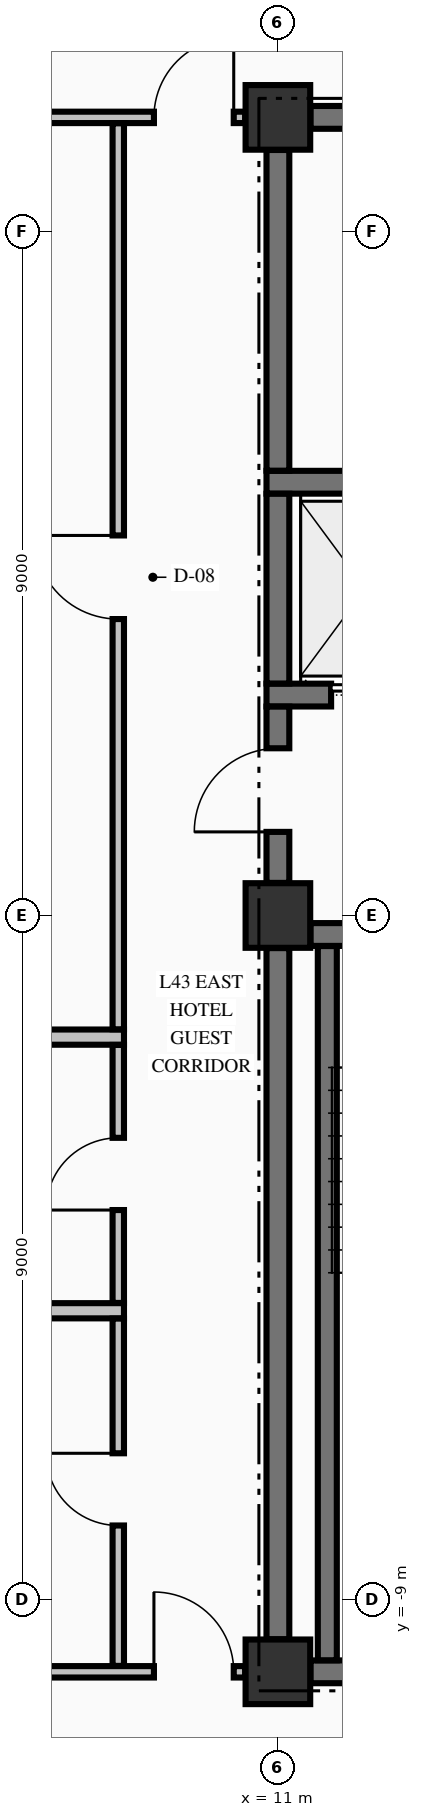
"""IFC4 building model, lengths in metres.
Left out: names, types, materials, properties, quantities, classifications, styles, units other than length and angle.
Written with IfcOpenShell. Run it as: python <this file> out.ifc"""

import sys

from ifc_helpers import new_model, si_unit, direction, frame, frame_2d, origin, origin_2d, place, context, subcontext, project, spatial, rectangle, extrude, element, fill, save


model = new_model("IFC4")
c1 = context("Model", 3, precision=1e-05, world=origin(), true_north=direction((0.0, 1.0)))
c2 = subcontext(c1, "Body", "Model", "MODEL_VIEW")
j1 = project(units=[si_unit("LENGTHUNIT", "METRE"), si_unit("PLANEANGLEUNIT", "RADIAN")], contexts=[c1])
p1 = place(None, origin())
s1 = spatial("IfcSite", under=j1, at=p1, CompositionType="ELEMENT")
p2 = place(p1, origin())
s2 = spatial("IfcBuilding", under=s1, at=p2, CompositionType="ELEMENT")
p3 = place(p2, frame((0.0, 0.0, 169.46)))
s3 = spatial("IfcBuildingStorey", under=s2, at=p3, CompositionType="ELEMENT", Elevation=169.46)
for number, where, z_axis, x_axis in (
    (1, (11.0, -9.95, -0.25), (0.0, 0.0, 1.0), (1.0, 0.0, 0.0)),
    (2, (11.0, 0.0, -0.25), (0.0, 0.0, 1.0), (1.0, 0.0, 0.0)),
    (3, (11.0, 10.5, -0.25), (0.0, 0.0, 1.0), (1.0, 0.0, 0.0)),
):
    element("IfcColumn", number, at=place(p3, frame(where, z_axis=z_axis, x_axis=x_axis)), inside=s3, PredefinedType="COLUMN", context=c2, shape_type="SweptSolid", body=[
        extrude(rectangle(XDim=0.85, YDim=0.85, at=origin_2d()), origin(), (0.0, 0.0, 1.0), 3.4),
    ])
p4 = place(p3, frame((11.429, -9.95, 0.0), z_axis=(0.0, 0.0, 1.0), x_axis=(1.0, 0.0, 0.0)))
e4 = element("IfcWall", 4, at=p4, inside=s3, PredefinedType="SHEAR", context=c2, shape_type="SweptSolid", body=[
    extrude(rectangle(XDim=3.271, YDim=0.3, at=frame_2d((1.635, 0.0))), origin(), (0.0, 0.0, 1.0), 3.15),
])
p5 = place(p3, frame((11.429, -0.25, 0.0), z_axis=(0.0, 0.0, 1.0), x_axis=(1.0, 0.0, 0.0)))
e5 = element("IfcWall", 5, at=p5, inside=s3, PredefinedType="SHEAR", context=c2, shape_type="SweptSolid", body=[
    extrude(rectangle(XDim=3.446, YDim=0.3, at=frame_2d((1.723, 0.0))), origin(), (0.0, 0.0, 1.0), 3.15),
])
p6 = place(p5, frame((1.171, 0.0, 0.0)))
e6 = element("IfcOpeningElement", 6, at=p6, cuts=e5, PredefinedType="OPENING", context=c2, shape_type="SweptSolid", body=[
    extrude(rectangle(XDim=1.1, YDim=2.15, at=frame_2d((0.55, 1.075))), frame((0.0, 0.16, 0.0), z_axis=(0.0, -1.0, 0.0), x_axis=(1.0, 0.0, 0.0)), (0.0, 0.0, 1.0), 0.32),
])
p7 = place(p3, frame((10.85, 2.9, 0.0), z_axis=(0.0, 0.0, 1.0), x_axis=(1.0, 0.0, 0.0)))
e7 = element("IfcWall", 7, at=p7, inside=s3, PredefinedType="SHEAR", context=c2, shape_type="SweptSolid", body=[
    extrude(rectangle(XDim=4.025, YDim=0.3, at=frame_2d((2.012, 0.0))), origin(), (0.0, 0.0, 1.0), 3.15),
])
p8 = place(p7, frame((0.85, 0.0, 0.0)))
e8 = element("IfcOpeningElement", 8, at=p8, cuts=e7, PredefinedType="OPENING", context=c2, shape_type="SweptSolid", body=[
    extrude(rectangle(XDim=1.1, YDim=2.2, at=frame_2d((0.55, 1.1))), frame((0.0, 0.16, 0.0), z_axis=(0.0, -1.0, 0.0), x_axis=(1.0, 0.0, 0.0)), (0.0, 0.0, 1.0), 0.32),
])
p9 = place(p3, frame((10.85, 5.7, 0.0), z_axis=(0.0, 0.0, 1.0), x_axis=(1.0, 0.0, 0.0)))
e9 = element("IfcWall", 9, at=p9, inside=s3, PredefinedType="SHEAR", context=c2, shape_type="SweptSolid", body=[
    extrude(rectangle(XDim=4.025, YDim=0.3, at=frame_2d((2.012, 0.0))), origin(), (0.0, 0.0, 1.0), 3.15),
])
p10 = place(p3, frame((11.429, 10.5, 0.0), z_axis=(0.0, 0.0, 1.0), x_axis=(1.0, 0.0, 0.0)))
e10 = element("IfcWall", 10, at=p10, inside=s3, PredefinedType="SHEAR", context=c2, shape_type="SweptSolid", body=[
    extrude(rectangle(XDim=3.271, YDim=0.3, at=frame_2d((1.635, 0.0))), origin(), (0.0, 0.0, 1.0), 3.15),
])
p11 = place(p10, frame((1.546, 0.0, 0.0)))
e11 = element("IfcOpeningElement", 11, at=p11, cuts=e10, PredefinedType="OPENING", context=c2, shape_type="SweptSolid", body=[
    extrude(rectangle(XDim=0.95, YDim=2.15, at=frame_2d((0.475, 1.075))), frame((0.0, 0.16, 0.0), z_axis=(0.0, -1.0, 0.0), x_axis=(1.0, 0.0, 0.0)), (0.0, 0.0, 1.0), 0.32),
])
p12 = place(p3, frame((-10.569, -9.95, 0.0), z_axis=(0.0, 0.0, 1.0), x_axis=(1.0, 0.0, 0.0)))
e12 = element("IfcWall", 12, at=p12, inside=s3, PredefinedType="PARTITIONING", context=c2, shape_type="SweptSolid", body=[
    extrude(rectangle(XDim=21.138, YDim=0.15, at=frame_2d((10.569, 0.0))), origin(), (0.0, 0.0, 1.0), 3.15),
])
p13 = place(p12, frame((0.15, 0.0, 0.0)))
e13 = element("IfcOpeningElement", 13, at=p13, cuts=e12, PredefinedType="OPENING", context=c2, shape_type="SweptSolid", body=[
    extrude(rectangle(XDim=1.05, YDim=2.15, at=frame_2d((0.525, 1.075))), frame((0.0, 0.085, 0.0), z_axis=(0.0, -1.0, 0.0), x_axis=(1.0, 0.0, 0.0)), (0.0, 0.0, 1.0), 0.17),
])
p14 = place(p12, frame((19.938, 0.0, 0.0)))
e14 = element("IfcOpeningElement", 14, at=p14, cuts=e12, PredefinedType="OPENING", context=c2, shape_type="SweptSolid", body=[
    extrude(rectangle(XDim=1.05, YDim=2.15, at=frame_2d((0.525, 1.075))), frame((0.0, 0.085, 0.0), z_axis=(0.0, -1.0, 0.0), x_axis=(1.0, 0.0, 0.0)), (0.0, 0.0, 1.0), 0.17),
])
p15 = place(p12, frame((12.144, 0.0, 0.0)))
e15 = element("IfcOpeningElement", 15, at=p15, cuts=e12, PredefinedType="OPENING", context=c2, shape_type="SweptSolid", body=[
    extrude(rectangle(XDim=0.95, YDim=2.15, at=frame_2d((0.475, 1.075))), frame((0.0, 0.085, 0.0), z_axis=(0.0, -1.0, 0.0), x_axis=(1.0, 0.0, 0.0)), (0.0, 0.0, 1.0), 0.17),
])
for number, where, z_axis, x_axis in (
    (16, (-1.9, -5.2, 0.0), (0.0, 0.0, 1.0), (1.0, 0.0, 0.0)),
    (17, (-1.9, -1.6, 0.0), (0.0, 0.0, 1.0), (1.0, 0.0, 0.0)),
):
    element("IfcWall", number, at=place(p3, frame(where, z_axis=z_axis, x_axis=x_axis)), inside=s3, PredefinedType="PARTITIONING", context=c2, shape_type="SweptSolid", body=[
        extrude(rectangle(XDim=10.875, YDim=0.2, at=frame_2d((5.438, 0.0))), origin(), (0.0, 0.0, 1.0), 3.15),
    ])
p16 = place(p3, frame((-10.569, 10.5, 0.0), z_axis=(0.0, 0.0, 1.0), x_axis=(1.0, 0.0, 0.0)))
e18 = element("IfcWall", 18, at=p16, inside=s3, PredefinedType="PARTITIONING", context=c2, shape_type="SweptSolid", body=[
    extrude(rectangle(XDim=21.138, YDim=0.15, at=frame_2d((10.569, 0.0))), origin(), (0.0, 0.0, 1.0), 3.15),
])
p17 = place(p16, frame((0.15, 0.0, 0.0)))
e19 = element("IfcOpeningElement", 19, at=p17, cuts=e18, PredefinedType="OPENING", context=c2, shape_type="SweptSolid", body=[
    extrude(rectangle(XDim=1.05, YDim=2.15, at=frame_2d((0.525, 1.075))), frame((0.0, 0.085, 0.0), z_axis=(0.0, -1.0, 0.0), x_axis=(1.0, 0.0, 0.0)), (0.0, 0.0, 1.0), 0.17),
])
p18 = place(p16, frame((19.938, 0.0, 0.0)))
e20 = element("IfcOpeningElement", 20, at=p18, cuts=e18, PredefinedType="OPENING", context=c2, shape_type="SweptSolid", body=[
    extrude(rectangle(XDim=1.05, YDim=2.15, at=frame_2d((0.525, 1.075))), frame((0.0, 0.085, 0.0), z_axis=(0.0, -1.0, 0.0), x_axis=(1.0, 0.0, 0.0)), (0.0, 0.0, 1.0), 0.17),
])
p19 = place(p3, frame((11.0, -9.521, 0.0), z_axis=(0.0, 0.0, 1.0), x_axis=(0.0, 1.0, 0.0)))
e21 = element("IfcWall", 21, at=p19, inside=s3, PredefinedType="SHEAR", context=c2, shape_type="SweptSolid", body=[
    extrude(rectangle(XDim=9.092, YDim=0.3, at=frame_2d((4.546, 0.0))), origin(), (0.0, 0.0, 1.0), 3.15),
])
p20 = place(p3, frame((11.0, 0.429, 0.0), z_axis=(0.0, 0.0, 1.0), x_axis=(0.0, 1.0, 0.0)))
e22 = element("IfcWall", 22, at=p20, inside=s3, PredefinedType="SHEAR", context=c2, shape_type="SweptSolid", body=[
    extrude(rectangle(XDim=2.319, YDim=0.3, at=frame_2d((1.16, 0.0))), origin(), (0.0, 0.0, 1.0), 3.15),
])
p21 = place(p20, frame((0.671, 0.0, 0.0)))
e23 = element("IfcOpeningElement", 23, at=p21, cuts=e22, PredefinedType="OPENING", context=c2, shape_type="SweptSolid", body=[
    extrude(rectangle(XDim=1.1, YDim=2.15, at=frame_2d((0.55, 1.075))), frame((0.0, 0.16, 0.0), z_axis=(0.0, -1.0, 0.0), x_axis=(1.0, 0.0, 0.0)), (0.0, 0.0, 1.0), 0.32),
])
p22 = place(p3, frame((11.0, 3.052, 0.0), z_axis=(0.0, 0.0, 1.0), x_axis=(0.0, 1.0, 0.0)))
e24 = element("IfcWall", 24, at=p22, inside=s3, PredefinedType="SHEAR", context=c2, shape_type="SweptSolid", body=[
    extrude(rectangle(XDim=2.496, YDim=0.3, at=frame_2d((1.248, 0.0))), origin(), (0.0, 0.0, 1.0), 3.15),
])
p23 = place(p3, frame((11.0, 5.852, 0.0), z_axis=(0.0, 0.0, 1.0), x_axis=(0.0, 1.0, 0.0)))
e25 = element("IfcWall", 25, at=p23, inside=s3, PredefinedType="SHEAR", context=c2, shape_type="SweptSolid", body=[
    extrude(rectangle(XDim=4.219, YDim=0.3, at=frame_2d((2.109, 0.0))), origin(), (0.0, 0.0, 1.0), 3.15),
])
p24 = place(p3, frame((11.65, -9.798, 0.0), z_axis=(0.0, 0.0, 1.0), x_axis=(0.0, 1.0, 0.0)))
e26 = element("IfcWall", 26, at=p24, inside=s3, PredefinedType="SOLIDWALL", context=c2, shape_type="SweptSolid", body=[
    extrude(rectangle(XDim=9.396, YDim=0.25, at=frame_2d((4.698, 0.0))), origin(), (0.0, 0.0, 1.0), 3.15),
])
p25 = place(p3, frame((8.9, -9.872, 0.0), z_axis=(0.0, 0.0, 1.0), x_axis=(0.0, 1.0, 0.0)))
e27 = element("IfcWall", 27, at=p25, inside=s3, PredefinedType="PARTITIONING", context=c2, shape_type="SweptSolid", body=[
    extrude(rectangle(XDim=4.569, YDim=0.15, at=frame_2d((2.285, 0.0))), origin(), (0.0, 0.0, 1.0), 3.15),
])
p26 = place(p25, frame((1.847, 0.0, 0.0)))
e28 = element("IfcOpeningElement", 28, at=p26, cuts=e27, PredefinedType="OPENING", context=c2, shape_type="SweptSolid", body=[
    extrude(rectangle(XDim=0.95, YDim=2.15, at=frame_2d((0.475, 1.075))), frame((0.0, 0.085, 0.0), z_axis=(0.0, -1.0, 0.0), x_axis=(1.0, 0.0, 0.0)), (0.0, 0.0, 1.0), 0.17),
])
p27 = place(p3, frame((8.9, -5.097, 0.0), z_axis=(0.0, 0.0, 1.0), x_axis=(0.0, 1.0, 0.0)))
e29 = element("IfcWall", 29, at=p27, inside=s3, PredefinedType="PARTITIONING", context=c2, shape_type="SweptSolid", body=[
    extrude(rectangle(XDim=3.394, YDim=0.15, at=frame_2d((1.697, 0.0))), origin(), (0.0, 0.0, 1.0), 3.15),
])
p28 = place(p27, frame((1.222, 0.0, 0.0)))
e30 = element("IfcOpeningElement", 30, at=p28, cuts=e29, PredefinedType="OPENING", context=c2, shape_type="SweptSolid", body=[
    extrude(rectangle(XDim=0.95, YDim=2.15, at=frame_2d((0.475, 1.075))), frame((0.0, 0.085, 0.0), z_axis=(0.0, -1.0, 0.0), x_axis=(1.0, 0.0, 0.0)), (0.0, 0.0, 1.0), 0.17),
])
p29 = place(p3, frame((8.9, -1.497, 0.0), z_axis=(0.0, 0.0, 1.0), x_axis=(0.0, 1.0, 0.0)))
e31 = element("IfcWall", 31, at=p29, inside=s3, PredefinedType="PARTITIONING", context=c2, shape_type="SweptSolid", body=[
    extrude(rectangle(XDim=11.919, YDim=0.15, at=frame_2d((5.959, 0.0))), origin(), (0.0, 0.0, 1.0), 3.15),
])
p30 = place(p29, frame((5.397, 0.0, 0.0)))
e32 = element("IfcOpeningElement", 32, at=p30, cuts=e31, PredefinedType="OPENING", context=c2, shape_type="SweptSolid", body=[
    extrude(rectangle(XDim=1.1, YDim=2.15, at=frame_2d((0.55, 1.075))), frame((0.0, 0.085, 0.0), z_axis=(0.0, -1.0, 0.0), x_axis=(1.0, 0.0, 0.0)), (0.0, 0.0, 1.0), 0.17),
])
p31 = place(p21, origin())
e33 = element("IfcDoor", 33, at=p31, inside=s3, OperationType="SINGLE_SWING_LEFT", PredefinedType="DOOR", context=c2, shape_type="SweptSolid", body=[
    extrude(rectangle(XDim=1.1, YDim=2.15, at=frame_2d((0.55, 1.075))), frame((0.0, 0.025, 0.0), z_axis=(0.0, -1.0, 0.0), x_axis=(1.0, 0.0, 0.0)), (0.0, 0.0, 1.0), 0.05),
])
fill(e23, e33)
p32 = place(p8, origin())
e34 = element("IfcDoor", 34, at=p32, inside=s3, OperationType="SLIDING_TO_RIGHT", PredefinedType="DOOR", context=c2, shape_type="SweptSolid", body=[
    extrude(rectangle(XDim=1.1, YDim=2.2, at=frame_2d((0.55, 1.1))), frame((0.0, 0.025, 0.0), z_axis=(0.0, -1.0, 0.0), x_axis=(1.0, 0.0, 0.0)), (0.0, 0.0, 1.0), 0.05),
])
fill(e8, e34)
p33 = place(p18, origin())
e35 = element("IfcDoor", 35, at=p33, inside=s3, OperationType="SINGLE_SWING_RIGHT", PredefinedType="DOOR", context=c2, shape_type="SweptSolid", body=[
    extrude(rectangle(XDim=1.05, YDim=2.15, at=frame_2d((0.525, 1.075))), frame((0.0, 0.025, 0.0), z_axis=(0.0, -1.0, 0.0), x_axis=(1.0, 0.0, 0.0)), (0.0, 0.0, 1.0), 0.05),
])
fill(e20, e35)
p34 = place(p14, origin())
e36 = element("IfcDoor", 36, at=p34, inside=s3, OperationType="SINGLE_SWING_LEFT", PredefinedType="DOOR", context=c2, shape_type="SweptSolid", body=[
    extrude(rectangle(XDim=1.05, YDim=2.15, at=frame_2d((0.525, 1.075))), frame((0.0, 0.025, 0.0), z_axis=(0.0, -1.0, 0.0), x_axis=(1.0, 0.0, 0.0)), (0.0, 0.0, 1.0), 0.05),
])
fill(e14, e36)
p35 = place(p30, origin())
e37 = element("IfcDoor", 37, at=p35, inside=s3, OperationType="SINGLE_SWING_RIGHT", PredefinedType="DOOR", context=c2, shape_type="SweptSolid", body=[
    extrude(rectangle(XDim=1.1, YDim=2.15, at=frame_2d((0.55, 1.075))), frame((0.0, 0.025, 0.0), z_axis=(0.0, -1.0, 0.0), x_axis=(1.0, 0.0, 0.0)), (0.0, 0.0, 1.0), 0.05),
])
fill(e32, e37)
p36 = place(p28, origin())
e38 = element("IfcDoor", 38, at=p36, inside=s3, OperationType="SINGLE_SWING_LEFT", PredefinedType="DOOR", context=c2, shape_type="SweptSolid", body=[
    extrude(rectangle(XDim=0.95, YDim=2.15, at=frame_2d((0.475, 1.075))), frame((0.0, 0.025, 0.0), z_axis=(0.0, -1.0, 0.0), x_axis=(1.0, 0.0, 0.0)), (0.0, 0.0, 1.0), 0.05),
])
fill(e30, e38)
p37 = place(p26, origin())
e39 = element("IfcDoor", 39, at=p37, inside=s3, OperationType="SINGLE_SWING_RIGHT", PredefinedType="DOOR", context=c2, shape_type="SweptSolid", body=[
    extrude(rectangle(XDim=0.95, YDim=2.15, at=frame_2d((0.475, 1.075))), frame((0.0, 0.025, 0.0), z_axis=(0.0, -1.0, 0.0), x_axis=(1.0, 0.0, 0.0)), (0.0, 0.0, 1.0), 0.05),
])
fill(e28, e39)
save(model, sys.argv[1])
